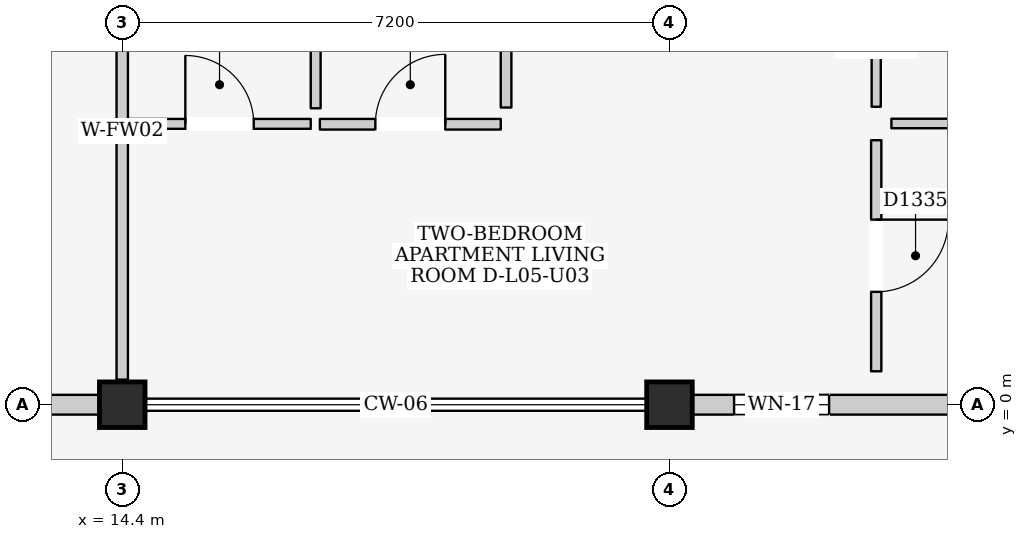
"""IFC4 building model, lengths in metres.
Left out: names, types, materials, properties, quantities, classifications, styles, units other than length and angle.
Written with IfcOpenShell. Run it as: python <this file> out.ifc"""

import sys

from ifc_helpers import new_model, si_unit, direction, frame, frame_2d, origin, origin_2d, place, context, subcontext, project, spatial, rectangle, extrude, element, fill, save


model = new_model("IFC4")
c1 = context("Model", 3, precision=1e-05, world=origin(), true_north=direction((0.0, 1.0)))
c2 = subcontext(c1, "Body", "Model", "MODEL_VIEW")
j1 = project(units=[si_unit("LENGTHUNIT", "METRE"), si_unit("PLANEANGLEUNIT", "RADIAN")], contexts=[c1])
p1 = place(None, origin())
s1 = spatial("IfcSite", under=j1, at=p1, CompositionType="ELEMENT")
p2 = place(p1, origin())
s2 = spatial("IfcBuilding", under=s1, at=p2, CompositionType="ELEMENT")
p3 = place(p2, frame((0.0, 0.0, 18.6)))
s3 = spatial("IfcBuildingStorey", under=s2, at=p3, CompositionType="ELEMENT", Elevation=18.6)
for number, where, z_axis, x_axis in (
    (1, (14.4, 0.0, 0.0), (0.0, 0.0, 1.0), (1.0, 0.0, 0.0)),
    (2, (21.6, 0.0, 0.0), (0.0, 0.0, 1.0), (1.0, 0.0, 0.0)),
):
    element("IfcColumn", number, at=place(p3, frame(where, z_axis=z_axis, x_axis=x_axis)), inside=s3, PredefinedType="COLUMN", context=c2, shape_type="SweptSolid", body=[
        extrude(rectangle(XDim=0.6, YDim=0.6, at=origin_2d()), origin(), (0.0, 0.0, 1.0), 3.3),
    ])
p4 = place(p3, frame((7.5, 0.0, 0.0), z_axis=(0.0, 0.0, 1.0), x_axis=(1.0, 0.0, 0.0)))
e3 = element("IfcWall", 3, at=p4, inside=s3, PredefinedType="ELEMENTEDWALL", context=c2, shape_type="SweptSolid", body=[
    extrude(rectangle(XDim=6.6, YDim=0.26, at=frame_2d((3.3, 0.0))), origin(), (0.0, 0.0, 1.0), 2.595),
])
p5 = place(p4, frame((3.85, 0.0, 0.0)))
e4 = element("IfcOpeningElement", 4, at=p5, cuts=e3, PredefinedType="OPENING", context=c2, shape_type="SweptSolid", body=[
    extrude(rectangle(XDim=1.6, YDim=2.12, at=frame_2d((0.8, 1.06))), frame((0.0, 0.145, 0.0), z_axis=(0.0, -1.0, 0.0), x_axis=(1.0, 0.0, 0.0)), (0.0, 0.0, 1.0), 0.29),
])
p6 = place(p4, frame((0.55, 0.0, 0.9)))
e5 = element("IfcOpeningElement", 5, at=p6, cuts=e3, PredefinedType="OPENING", context=c2, shape_type="SweptSolid", body=[
    extrude(rectangle(XDim=1.7, YDim=1.45, at=frame_2d((0.85, 0.725))), frame((0.0, 0.145, 0.0), z_axis=(0.0, -1.0, 0.0), x_axis=(1.0, 0.0, 0.0)), (0.0, 0.0, 1.0), 0.29),
])
p7 = place(p3, frame((21.9, 0.0, 0.0), z_axis=(0.0, 0.0, 1.0), x_axis=(1.0, 0.0, 0.0)))
e6 = element("IfcWall", 6, at=p7, inside=s3, PredefinedType="ELEMENTEDWALL", context=c2, shape_type="SweptSolid", body=[
    extrude(rectangle(XDim=6.6, YDim=0.26, at=frame_2d((3.3, 0.0))), origin(), (0.0, 0.0, 1.0), 2.595),
])
p8 = place(p7, frame((3.85, 0.0, 0.0)))
e7 = element("IfcOpeningElement", 7, at=p8, cuts=e6, PredefinedType="OPENING", context=c2, shape_type="SweptSolid", body=[
    extrude(rectangle(XDim=2.4, YDim=2.12, at=frame_2d((1.2, 1.06))), frame((0.0, 0.145, 0.0), z_axis=(0.0, -1.0, 0.0), x_axis=(1.0, 0.0, 0.0)), (0.0, 0.0, 1.0), 0.29),
])
p9 = place(p7, frame((0.55, 0.0, 0.9)))
e8 = element("IfcOpeningElement", 8, at=p9, cuts=e6, PredefinedType="OPENING", context=c2, shape_type="SweptSolid", body=[
    extrude(rectangle(XDim=1.25, YDim=1.3, at=frame_2d((0.625, 0.65))), frame((0.0, 0.145, 0.0), z_axis=(0.0, -1.0, 0.0), x_axis=(1.0, 0.0, 0.0)), (0.0, 0.0, 1.0), 0.29),
])
p10 = place(p3, frame((14.4, 0.33, 0.0), z_axis=(0.0, 0.0, 1.0), x_axis=(0.0, 1.0, 0.0)))
e9 = element("IfcWall", 9, at=p10, inside=s3, PredefinedType="PARTITIONING", context=c2, shape_type="SweptSolid", body=[
    extrude(rectangle(XDim=6.54, YDim=0.15, at=frame_2d((3.27, 0.0))), origin(), (0.0, 0.0, 1.0), 2.545),
])
p11 = place(p3, frame((14.48, 3.695, 0.0), z_axis=(0.0, 0.0, 1.0), x_axis=(1.0, 0.0, 0.0)))
e10 = element("IfcWall", 10, at=p11, inside=s3, PredefinedType="PARTITIONING", context=c2, shape_type="SweptSolid", body=[
    extrude(rectangle(XDim=2.4, YDim=0.13, at=frame_2d((1.2, 0.0))), origin(), (0.0, 0.0, 1.0), 3.06),
])
p12 = place(p11, frame((0.75, 0.0, 0.0)))
e11 = element("IfcOpeningElement", 11, at=p12, cuts=e10, PredefinedType="OPENING", context=c2, shape_type="SweptSolid", body=[
    extrude(rectangle(XDim=0.9, YDim=2.1, at=frame_2d((0.45, 1.05))), frame((0.0, 0.08, 0.0), z_axis=(0.0, -1.0, 0.0), x_axis=(1.0, 0.0, 0.0)), (0.0, 0.0, 1.0), 0.16),
])
p13 = place(p3, frame((16.945, 3.9, 0.0), z_axis=(0.0, 0.0, 1.0), x_axis=(0.0, 1.0, 0.0)))
e12 = element("IfcWall", 12, at=p13, inside=s3, PredefinedType="PARTITIONING", context=c2, shape_type="SweptSolid", body=[
    extrude(rectangle(XDim=3.04, YDim=0.13, at=frame_2d((1.52, 0.0))), origin(), (0.0, 0.0, 1.0), 3.06),
])
p14 = place(p3, frame((17.0, 3.69, 0.0), z_axis=(0.0, 0.0, 1.0), x_axis=(1.0, 0.0, 0.0)))
e13 = element("IfcWall", 13, at=p14, inside=s3, PredefinedType="PARTITIONING", context=c2, shape_type="SweptSolid", body=[
    extrude(rectangle(XDim=2.38, YDim=0.14, at=frame_2d((1.19, 0.0))), origin(), (0.0, 0.0, 1.0), 3.06),
])
p15 = place(p14, frame((0.73, 0.0, 0.0)))
e14 = element("IfcOpeningElement", 14, at=p15, cuts=e13, PredefinedType="OPENING", context=c2, shape_type="SweptSolid", body=[
    extrude(rectangle(XDim=0.92, YDim=2.1, at=frame_2d((0.46, 1.05))), frame((0.0, 0.085, 0.0), z_axis=(0.0, -1.0, 0.0), x_axis=(1.0, 0.0, 0.0)), (0.0, 0.0, 1.0), 0.17),
])
p16 = place(p3, frame((19.45, 3.91, 0.0), z_axis=(0.0, 0.0, 1.0), x_axis=(0.0, 1.0, 0.0)))
e15 = element("IfcWall", 15, at=p16, inside=s3, PredefinedType="PARTITIONING", context=c2, shape_type="SweptSolid", body=[
    extrude(rectangle(XDim=3.06, YDim=0.14, at=frame_2d((1.53, 0.0))), origin(), (0.0, 0.0, 1.0), 3.06),
])
p17 = place(p3, frame((24.32, 0.44, 0.0), z_axis=(0.0, 0.0, 1.0), x_axis=(0.0, 1.0, 0.0)))
e16 = element("IfcWall", 16, at=p17, inside=s3, PredefinedType="PARTITIONING", context=c2, shape_type="SweptSolid", body=[
    extrude(rectangle(XDim=3.04, YDim=0.135, at=frame_2d((1.52, 0.0))), origin(), (0.0, 0.0, 1.0), 3.06),
])
p18 = place(p17, frame((1.045, 0.0, 0.0)))
e17 = element("IfcOpeningElement", 17, at=p18, cuts=e16, PredefinedType="OPENING", context=c2, shape_type="SweptSolid", body=[
    extrude(rectangle(XDim=0.95, YDim=2.15, at=frame_2d((0.475, 1.075))), frame((0.0, 0.083, 0.0), z_axis=(0.0, -1.0, 0.0), x_axis=(1.0, 0.0, 0.0)), (0.0, 0.0, 1.0), 0.165),
])
p19 = place(p3, frame((24.52, 3.7, 0.0), z_axis=(0.0, 0.0, 1.0), x_axis=(1.0, 0.0, 0.0)))
e18 = element("IfcWall", 18, at=p19, inside=s3, PredefinedType="PARTITIONING", context=c2, shape_type="SweptSolid", body=[
    extrude(rectangle(XDim=4.06, YDim=0.125, at=frame_2d((2.03, 0.0))), origin(), (0.0, 0.0, 1.0), 3.06),
])
p20 = place(p3, frame((24.32, 3.92, 0.0), z_axis=(0.0, 0.0, 1.0), x_axis=(0.0, 1.0, 0.0)))
e19 = element("IfcWall", 19, at=p20, inside=s3, PredefinedType="PARTITIONING", context=c2, shape_type="SweptSolid", body=[
    extrude(rectangle(XDim=3.04, YDim=0.12, at=frame_2d((1.52, 0.0))), origin(), (0.0, 0.0, 1.0), 3.06),
])
p21 = place(p20, frame((1.04, 0.0, 0.0)))
e20 = element("IfcOpeningElement", 20, at=p21, cuts=e19, PredefinedType="OPENING", context=c2, shape_type="SweptSolid", body=[
    extrude(rectangle(XDim=0.96, YDim=2.15, at=frame_2d((0.48, 1.075))), frame((0.0, 0.075, 0.0), z_axis=(0.0, -1.0, 0.0), x_axis=(1.0, 0.0, 0.0)), (0.0, 0.0, 1.0), 0.15),
])
p22 = place(p9, origin())
e21 = element("IfcWindow", 21, at=p22, inside=s3, PartitioningType="SINGLE_PANEL", PredefinedType="WINDOW", context=c2, shape_type="SweptSolid", body=[
    extrude(rectangle(XDim=1.25, YDim=1.3, at=frame_2d((0.625, 0.65))), frame((0.0, 0.03, 0.0), z_axis=(0.0, -1.0, 0.0), x_axis=(1.0, 0.0, 0.0)), (0.0, 0.0, 1.0), 0.06),
])
fill(e8, e21)
p23 = place(p12, origin())
e22 = element("IfcDoor", 22, at=p23, inside=s3, OperationType="SINGLE_SWING_LEFT", PredefinedType="DOOR", context=c2, shape_type="SweptSolid", body=[
    extrude(rectangle(XDim=0.9, YDim=2.1, at=frame_2d((0.45, 1.05))), frame((0.0, 0.025, 0.0), z_axis=(0.0, -1.0, 0.0), x_axis=(1.0, 0.0, 0.0)), (0.0, 0.0, 1.0), 0.05),
])
fill(e11, e22)
p24 = place(p15, origin())
e23 = element("IfcDoor", 23, at=p24, inside=s3, OperationType="SINGLE_SWING_RIGHT", PredefinedType="DOOR", context=c2, shape_type="SweptSolid", body=[
    extrude(rectangle(XDim=0.92, YDim=2.1, at=frame_2d((0.46, 1.05))), frame((0.0, 0.025, 0.0), z_axis=(0.0, -1.0, 0.0), x_axis=(1.0, 0.0, 0.0)), (0.0, 0.0, 1.0), 0.05),
])
fill(e14, e23)
p25 = place(p18, frame((0.95, 0.0, 0.0), z_axis=(0.0, 0.0, 1.0), x_axis=(-1.0, 0.0, 0.0)))
e24 = element("IfcDoor", 24, at=p25, inside=s3, OperationType="SINGLE_SWING_LEFT", PredefinedType="DOOR", context=c2, shape_type="SweptSolid", body=[
    extrude(rectangle(XDim=0.95, YDim=2.15, at=frame_2d((0.475, 1.075))), frame((0.0, 0.025, 0.0), z_axis=(0.0, -1.0, 0.0), x_axis=(1.0, 0.0, 0.0)), (0.0, 0.0, 1.0), 0.05),
])
fill(e17, e24)
save(model, sys.argv[1])
